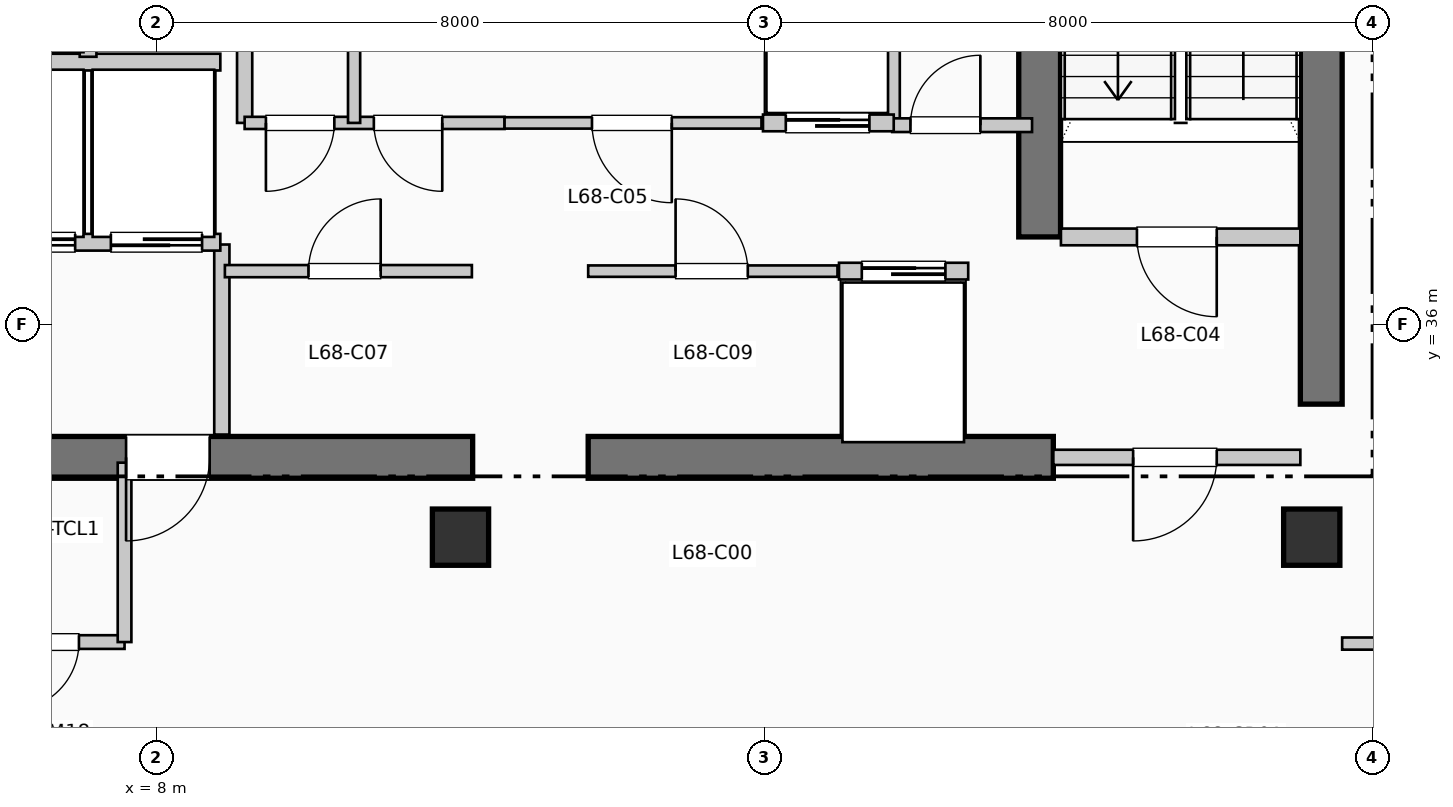
"""IFC4 building model, lengths in metres.
Left out: names, types, materials, properties, quantities, classifications, styles, units other than length and angle.
Written with IfcOpenShell. Run it as: python <this file> out.ifc"""

import sys

from ifc_helpers import new_model, si_unit, direction, frame, frame_2d, origin, origin_2d, place, context, subcontext, project, spatial, rectangle, extrude, element, fill, save


model = new_model("IFC4")
c1 = context("Model", 3, precision=1e-05, world=origin(), true_north=direction((0.0, 1.0)))
c2 = subcontext(c1, "Body", "Model", "MODEL_VIEW")
j1 = project(units=[si_unit("LENGTHUNIT", "METRE"), si_unit("PLANEANGLEUNIT", "RADIAN")], contexts=[c1])
p1 = place(None, origin())
s1 = spatial("IfcSite", under=j1, at=p1, CompositionType="ELEMENT")
p2 = place(p1, origin())
s2 = spatial("IfcBuilding", under=s1, at=p2, CompositionType="ELEMENT")
p3 = place(p2, frame((0.0, 0.0, 280.17)))
s3 = spatial("IfcBuildingStorey", under=s2, at=p3, CompositionType="ELEMENT", Elevation=280.17)
p4 = place(p3, frame((23.325, 34.95, 0.0), z_axis=(0.0, 0.0, 1.0), x_axis=(0.0, 1.0, 0.0)))
e1 = element("IfcWall", 1, at=p4, inside=s3, PredefinedType="SHEAR", context=c2, shape_type="SweptSolid", body=[
    extrude(rectangle(XDim=10.64, YDim=0.55, at=frame_2d((5.32, 0.0))), origin(), (0.0, 0.0, 1.0), 3.96),
])
p5 = place(p3, frame((1.45, 34.25, 0.0), z_axis=(0.0, 0.0, 1.0), x_axis=(1.0, 0.0, 0.0)))
e2 = element("IfcWall", 2, at=p5, inside=s3, PredefinedType="SHEAR", context=c2, shape_type="SweptSolid", body=[
    extrude(rectangle(XDim=10.71, YDim=0.55, at=frame_2d((5.355, 0.0))), origin(), (0.0, 0.0, 1.0), 3.96),
])
p6 = place(p5, frame((7.25, 0.0, 0.0), z_axis=(0.0, 0.0, 1.0), x_axis=(-1.0, 0.0, 0.0)))
e3 = element("IfcOpeningElement", 3, at=p6, cuts=e2, PredefinedType="OPENING", context=c2, shape_type="SweptSolid", body=[
    extrude(rectangle(XDim=1.1, YDim=2.15, at=frame_2d((0.55, 1.075))), frame((0.0, 0.285, 0.0), z_axis=(0.0, -1.0, 0.0), x_axis=(1.0, 0.0, 0.0)), (0.0, 0.0, 1.0), 0.57),
])
p7 = place(p3, frame((13.68, 34.25, 0.0), z_axis=(0.0, 0.0, 1.0), x_axis=(1.0, 0.0, 0.0)))
e4 = element("IfcWall", 4, at=p7, inside=s3, PredefinedType="SHEAR", context=c2, shape_type="SweptSolid", body=[
    extrude(rectangle(XDim=6.12, YDim=0.55, at=frame_2d((3.06, 0.0))), origin(), (0.0, 0.0, 1.0), 3.96),
])
p8 = place(p3, frame((19.62, 37.15, 0.0), z_axis=(0.0, 0.0, 1.0), x_axis=(0.0, 1.0, 0.0)))
e5 = element("IfcWall", 5, at=p8, inside=s3, PredefinedType="SHEAR", context=c2, shape_type="SweptSolid", body=[
    extrude(rectangle(XDim=7.89, YDim=0.55, at=frame_2d((3.945, 0.0))), origin(), (0.0, 0.0, 1.0), 3.96),
])
for number, where, z_axis, x_axis in (
    (6, (12.0, 33.2, 0.0), (0.0, 0.0, 1.0), (1.0, 0.0, 0.0)),
    (7, (23.2, 33.2, 0.0), (0.0, 0.0, 1.0), (1.0, 0.0, 0.0)),
):
    element("IfcColumn", number, at=place(p3, frame(where, z_axis=z_axis, x_axis=x_axis)), inside=s3, PredefinedType="COLUMN", context=c2, shape_type="SweptSolid", body=[
        extrude(rectangle(XDim=0.74, YDim=0.74, at=origin_2d()), origin(), (0.0, 0.0, 1.0), 3.96),
    ])
p9 = place(p3, frame((8.86, 34.55, 0.0), z_axis=(0.0, 0.0, 1.0), x_axis=(0.0, 1.0, 0.0)))
e8 = element("IfcWall", 8, at=p9, inside=s3, PredefinedType="PARTITIONING", context=c2, shape_type="SweptSolid", body=[
    extrude(rectangle(XDim=2.5, YDim=0.2, at=frame_2d((1.25, 0.0))), origin(), (0.0, 0.0, 1.0), 3.74),
])
p10 = place(p3, frame((19.9, 37.15, 0.0), z_axis=(0.0, 0.0, 1.0), x_axis=(1.0, 0.0, 0.0)))
e9 = element("IfcWall", 9, at=p10, inside=s3, PredefinedType="PARTITIONING", context=c2, shape_type="SweptSolid", body=[
    extrude(rectangle(XDim=3.15, YDim=0.22, at=frame_2d((1.575, 0.0))), origin(), (0.0, 0.0, 1.0), 3.74),
])
p11 = place(p10, frame((2.05, 0.0, 0.0), z_axis=(0.0, 0.0, 1.0), x_axis=(-1.0, 0.0, 0.0)))
e10 = element("IfcOpeningElement", 10, at=p11, cuts=e9, PredefinedType="OPENING", context=c2, shape_type="SweptSolid", body=[
    extrude(rectangle(XDim=1.05, YDim=2.15, at=frame_2d((0.525, 1.075))), frame((0.0, 0.12, 0.0), z_axis=(0.0, -1.0, 0.0), x_axis=(1.0, 0.0, 0.0)), (0.0, 0.0, 1.0), 0.24),
])
p12 = place(p3, frame((19.8, 34.25, 0.0), z_axis=(0.0, 0.0, 1.0), x_axis=(1.0, 0.0, 0.0)))
e11 = element("IfcWall", 11, at=p12, inside=s3, PredefinedType="PARTITIONING", context=c2, shape_type="SweptSolid", body=[
    extrude(rectangle(XDim=3.25, YDim=0.2, at=frame_2d((1.625, 0.0))), origin(), (0.0, 0.0, 1.0), 3.74),
])
p13 = place(p12, frame((2.15, 0.0, 0.0), z_axis=(0.0, 0.0, 1.0), x_axis=(-1.0, 0.0, 0.0)))
e12 = element("IfcOpeningElement", 12, at=p13, cuts=e11, PredefinedType="OPENING", context=c2, shape_type="SweptSolid", body=[
    extrude(rectangle(XDim=1.1, YDim=2.15, at=frame_2d((0.55, 1.075))), frame((0.0, 0.11, 0.0), z_axis=(0.0, -1.0, 0.0), x_axis=(1.0, 0.0, 0.0)), (0.0, 0.0, 1.0), 0.22),
])
p14 = place(p3, frame((5.38, 37.08, 0.0), z_axis=(0.0, 0.0, 1.0), x_axis=(1.0, 0.0, 0.0)))
e13 = element("IfcWall", 13, at=p14, inside=s3, PredefinedType="PARTITIONING", context=c2, shape_type="SweptSolid", body=[
    extrude(rectangle(XDim=3.46, YDim=0.22, at=frame_2d((1.73, 0.0))), origin(), (0.0, 0.0, 1.0), 3.74),
])
p15 = place(p14, frame((1.55, 0.0, 0.0), z_axis=(0.0, 0.0, 1.0), x_axis=(-1.0, 0.0, 0.0)))
e14 = element("IfcOpeningElement", 14, at=p15, cuts=e13, PredefinedType="OPENING", context=c2, shape_type="SweptSolid", body=[
    extrude(rectangle(XDim=1.2, YDim=2.2, at=frame_2d((0.6, 1.1))), frame((0.0, 0.12, 0.0), z_axis=(0.0, -1.0, 0.0), x_axis=(1.0, 0.0, 0.0)), (0.0, 0.0, 1.0), 0.24),
])
p16 = place(p14, frame((3.22, 0.0, 0.0), z_axis=(0.0, 0.0, 1.0), x_axis=(-1.0, 0.0, 0.0)))
e15 = element("IfcOpeningElement", 15, at=p16, cuts=e13, PredefinedType="OPENING", context=c2, shape_type="SweptSolid", body=[
    extrude(rectangle(XDim=1.2, YDim=2.2, at=frame_2d((0.6, 1.1))), frame((0.0, 0.12, 0.0), z_axis=(0.0, -1.0, 0.0), x_axis=(1.0, 0.0, 0.0)), (0.0, 0.0, 1.0), 0.24),
])
p17 = place(p3, frame((5.38, 39.45, 0.0), z_axis=(0.0, 0.0, 1.0), x_axis=(1.0, 0.0, 0.0)))
e16 = element("IfcWall", 16, at=p17, inside=s3, PredefinedType="PARTITIONING", context=c2, shape_type="SweptSolid", body=[
    extrude(rectangle(XDim=3.46, YDim=0.22, at=frame_2d((1.73, 0.0))), origin(), (0.0, 0.0, 1.0), 3.74),
])
p18 = place(p3, frame((7.1, 39.52, 0.0), z_axis=(0.0, 0.0, 1.0), x_axis=(0.0, 1.0, 0.0)))
e17 = element("IfcWall", 17, at=p18, inside=s3, PredefinedType="PARTITIONING", context=c2, shape_type="SweptSolid", body=[
    extrude(rectangle(XDim=2.93, YDim=0.22, at=frame_2d((1.465, 0.0))), origin(), (0.0, 0.0, 1.0), 3.74),
])
p19 = place(p18, frame((0.85, 0.0, 0.0)))
e18 = element("IfcOpeningElement", 18, at=p19, cuts=e17, PredefinedType="OPENING", context=c2, shape_type="SweptSolid", body=[
    extrude(rectangle(XDim=1.1, YDim=2.2, at=frame_2d((0.55, 1.1))), frame((0.0, 0.12, 0.0), z_axis=(0.0, -1.0, 0.0), x_axis=(1.0, 0.0, 0.0)), (0.0, 0.0, 1.0), 0.24),
])
for number, where, z_axis, x_axis in (
    (19, (9.16, 38.65, 0.0), (0.0, 0.0, 1.0), (0.0, 1.0, 0.0)),
    (20, (17.68, 38.65, 0.0), (0.0, 0.0, 1.0), (0.0, 1.0, 0.0)),
):
    element("IfcWall", number, at=place(p3, frame(where, z_axis=z_axis, x_axis=x_axis)), inside=s3, PredefinedType="PARTITIONING", context=c2, shape_type="SweptSolid", body=[
        extrude(rectangle(XDim=2.35, YDim=0.2, at=frame_2d((1.175, 0.0))), origin(), (0.0, 0.0, 1.0), 3.74),
    ])
p20 = place(p3, frame((17.68, 38.62, 0.0), z_axis=(0.0, 0.0, 1.0), x_axis=(1.0, 0.0, 0.0)))
e21 = element("IfcWall", 21, at=p20, inside=s3, PredefinedType="PARTITIONING", context=c2, shape_type="SweptSolid", body=[
    extrude(rectangle(XDim=1.84, YDim=0.18, at=frame_2d((0.92, 0.0))), origin(), (0.0, 0.0, 1.0), 3.74),
])
p21 = place(p20, frame((0.24, 0.0, 0.0)))
e22 = element("IfcOpeningElement", 22, at=p21, cuts=e21, PredefinedType="OPENING", context=c2, shape_type="SweptSolid", body=[
    extrude(rectangle(XDim=0.92, YDim=2.1, at=frame_2d((0.46, 1.05))), frame((0.0, 0.1, 0.0), z_axis=(0.0, -1.0, 0.0), x_axis=(1.0, 0.0, 0.0)), (0.0, 0.0, 1.0), 0.2),
])
p22 = place(p3, frame((5.5, 31.82, 0.0), z_axis=(0.0, 0.0, 1.0), x_axis=(1.0, 0.0, 0.0)))
e23 = element("IfcWall", 23, at=p22, inside=s3, PredefinedType="PLUMBINGWALL", context=c2, shape_type="SweptSolid", body=[
    extrude(rectangle(XDim=2.08, YDim=0.18, at=frame_2d((1.04, 0.0))), origin(), (0.0, 0.0, 1.0), 3.74),
])
p23 = place(p22, frame((1.48, 0.0, 0.0), z_axis=(0.0, 0.0, 1.0), x_axis=(-1.0, 0.0, 0.0)))
e24 = element("IfcOpeningElement", 24, at=p23, cuts=e23, PredefinedType="OPENING", context=c2, shape_type="SweptSolid", body=[
    extrude(rectangle(XDim=0.9, YDim=2.1, at=frame_2d((0.45, 1.05))), frame((0.0, 0.1, 0.0), z_axis=(0.0, -1.0, 0.0), x_axis=(1.0, 0.0, 0.0)), (0.0, 0.0, 1.0), 0.2),
])
p24 = place(p3, frame((7.58, 31.82, 0.0), z_axis=(0.0, 0.0, 1.0), x_axis=(0.0, 1.0, 0.0)))
e25 = element("IfcWall", 25, at=p24, inside=s3, PredefinedType="PLUMBINGWALL", context=c2, shape_type="SweptSolid", body=[
    extrude(rectangle(XDim=2.36, YDim=0.18, at=frame_2d((1.18, 0.0))), origin(), (0.0, 0.0, 1.0), 3.74),
])
p25 = place(p3, frame((8.9, 36.7, 0.0), z_axis=(0.0, 0.0, 1.0), x_axis=(1.0, 0.0, 0.0)))
e26 = element("IfcWall", 26, at=p25, inside=s3, PredefinedType="PARTITIONING", context=c2, shape_type="SweptSolid", body=[
    extrude(rectangle(XDim=3.25, YDim=0.16, at=frame_2d((1.625, 0.0))), origin(), (0.0, 0.0, 1.0), 3.74),
])
p26 = place(p25, frame((1.1, 0.0, 0.0)))
e27 = element("IfcOpeningElement", 27, at=p26, cuts=e26, PredefinedType="OPENING", context=c2, shape_type="SweptSolid", body=[
    extrude(rectangle(XDim=0.95, YDim=2.15, at=frame_2d((0.475, 1.075))), frame((0.0, 0.09, 0.0), z_axis=(0.0, -1.0, 0.0), x_axis=(1.0, 0.0, 0.0)), (0.0, 0.0, 1.0), 0.18),
])
p27 = place(p3, frame((9.16, 38.65, 0.0), z_axis=(0.0, 0.0, 1.0), x_axis=(1.0, 0.0, 0.0)))
e28 = element("IfcWall", 28, at=p27, inside=s3, PredefinedType="PARTITIONING", context=c2, shape_type="SweptSolid", body=[
    extrude(rectangle(XDim=3.42, YDim=0.16, at=frame_2d((1.71, 0.0))), origin(), (0.0, 0.0, 1.0), 3.74),
])
p28 = place(p27, frame((1.18, 0.0, 0.0), z_axis=(0.0, 0.0, 1.0), x_axis=(-1.0, 0.0, 0.0)))
e29 = element("IfcOpeningElement", 29, at=p28, cuts=e28, PredefinedType="OPENING", context=c2, shape_type="SweptSolid", body=[
    extrude(rectangle(XDim=0.9, YDim=2.15, at=frame_2d((0.45, 1.075))), frame((0.0, 0.09, 0.0), z_axis=(0.0, -1.0, 0.0), x_axis=(1.0, 0.0, 0.0)), (0.0, 0.0, 1.0), 0.18),
])
p29 = place(p27, frame((2.6, 0.0, 0.0), z_axis=(0.0, 0.0, 1.0), x_axis=(-1.0, 0.0, 0.0)))
e30 = element("IfcOpeningElement", 30, at=p29, cuts=e28, PredefinedType="OPENING", context=c2, shape_type="SweptSolid", body=[
    extrude(rectangle(XDim=0.9, YDim=2.15, at=frame_2d((0.45, 1.075))), frame((0.0, 0.09, 0.0), z_axis=(0.0, -1.0, 0.0), x_axis=(1.0, 0.0, 0.0)), (0.0, 0.0, 1.0), 0.18),
])
p30 = place(p3, frame((10.6, 38.65, 0.0), z_axis=(0.0, 0.0, 1.0), x_axis=(0.0, 1.0, 0.0)))
e31 = element("IfcWall", 31, at=p30, inside=s3, PredefinedType="PARTITIONING", context=c2, shape_type="SweptSolid", body=[
    extrude(rectangle(XDim=2.35, YDim=0.16, at=frame_2d((1.175, 0.0))), origin(), (0.0, 0.0, 1.0), 3.74),
])
p31 = place(p3, frame((13.68, 36.7, 0.0), z_axis=(0.0, 0.0, 1.0), x_axis=(1.0, 0.0, 0.0)))
e32 = element("IfcWall", 32, at=p31, inside=s3, PredefinedType="PARTITIONING", context=c2, shape_type="SweptSolid", body=[
    extrude(rectangle(XDim=3.28, YDim=0.15, at=frame_2d((1.64, 0.0))), origin(), (0.0, 0.0, 1.0), 3.74),
])
p32 = place(p31, frame((1.15, 0.0, 0.0)))
e33 = element("IfcOpeningElement", 33, at=p32, cuts=e32, PredefinedType="OPENING", context=c2, shape_type="SweptSolid", body=[
    extrude(rectangle(XDim=0.95, YDim=2.15, at=frame_2d((0.475, 1.075))), frame((0.0, 0.085, 0.0), z_axis=(0.0, -1.0, 0.0), x_axis=(1.0, 0.0, 0.0)), (0.0, 0.0, 1.0), 0.17),
])
p33 = place(p3, frame((12.58, 38.65, 0.0), z_axis=(0.0, 0.0, 1.0), x_axis=(1.0, 0.0, 0.0)))
e34 = element("IfcWall", 34, at=p33, inside=s3, PredefinedType="PARTITIONING", context=c2, shape_type="SweptSolid", body=[
    extrude(rectangle(XDim=3.38, YDim=0.15, at=frame_2d((1.69, 0.0))), origin(), (0.0, 0.0, 1.0), 3.74),
])
p34 = place(p33, frame((2.2, 0.0, 0.0), z_axis=(0.0, 0.0, 1.0), x_axis=(-1.0, 0.0, 0.0)))
e35 = element("IfcOpeningElement", 35, at=p34, cuts=e34, PredefinedType="OPENING", context=c2, shape_type="SweptSolid", body=[
    extrude(rectangle(XDim=1.05, YDim=2.15, at=frame_2d((0.525, 1.075))), frame((0.0, 0.085, 0.0), z_axis=(0.0, -1.0, 0.0), x_axis=(1.0, 0.0, 0.0)), (0.0, 0.0, 1.0), 0.17),
])
p35 = place(p3, frame((16.98, 36.7, 0.0), z_axis=(0.0, 0.0, 1.0), x_axis=(1.0, 0.0, 0.0)))
e36 = element("IfcWall", 36, at=p35, inside=s3, PredefinedType="PARTITIONING", context=c2, shape_type="SweptSolid", body=[
    extrude(rectangle(XDim=1.7, YDim=0.22, at=frame_2d((0.85, 0.0))), origin(), (0.0, 0.0, 1.0), 3.74),
])
p36 = place(p35, frame((0.3, 0.0, 0.0)))
e37 = element("IfcOpeningElement", 37, at=p36, cuts=e36, PredefinedType="OPENING", context=c2, shape_type="SweptSolid", body=[
    extrude(rectangle(XDim=1.1, YDim=2.2, at=frame_2d((0.55, 1.1))), frame((0.0, 0.12, 0.0), z_axis=(0.0, -1.0, 0.0), x_axis=(1.0, 0.0, 0.0)), (0.0, 0.0, 1.0), 0.24),
])
p37 = place(p3, frame((15.98, 38.65, 0.0), z_axis=(0.0, 0.0, 1.0), x_axis=(1.0, 0.0, 0.0)))
e38 = element("IfcWall", 38, at=p37, inside=s3, PredefinedType="PARTITIONING", context=c2, shape_type="SweptSolid", body=[
    extrude(rectangle(XDim=1.72, YDim=0.22, at=frame_2d((0.86, 0.0))), origin(), (0.0, 0.0, 1.0), 3.74),
])
p38 = place(p37, frame((0.3, 0.0, 0.0)))
e39 = element("IfcOpeningElement", 39, at=p38, cuts=e38, PredefinedType="OPENING", context=c2, shape_type="SweptSolid", body=[
    extrude(rectangle(XDim=1.1, YDim=2.2, at=frame_2d((0.55, 1.1))), frame((0.0, 0.12, 0.0), z_axis=(0.0, -1.0, 0.0), x_axis=(1.0, 0.0, 0.0)), (0.0, 0.0, 1.0), 0.24),
])
p39 = place(p3, frame((23.6, 31.8, 0.0), z_axis=(0.0, 0.0, 1.0), x_axis=(1.0, 0.0, 0.0)))
e40 = element("IfcWall", 40, at=p39, inside=s3, PredefinedType="PARTITIONING", context=c2, shape_type="SweptSolid", body=[
    extrude(rectangle(XDim=20.61, YDim=0.16, at=frame_2d((10.305, 0.0))), origin(), (0.0, 0.0, 1.0), 3.74),
])
p40 = place(p39, frame((4.677, 0.0, 0.0)))
e41 = element("IfcOpeningElement", 41, at=p40, cuts=e40, PredefinedType="OPENING", context=c2, shape_type="SweptSolid", body=[
    extrude(rectangle(XDim=0.95, YDim=2.15, at=frame_2d((0.475, 1.075))), frame((0.0, 0.09, 0.0), z_axis=(0.0, -1.0, 0.0), x_axis=(1.0, 0.0, 0.0)), (0.0, 0.0, 1.0), 0.18),
])
p41 = place(p39, frame((14.982, 0.0, 0.0)))
e42 = element("IfcOpeningElement", 42, at=p41, cuts=e40, PredefinedType="OPENING", context=c2, shape_type="SweptSolid", body=[
    extrude(rectangle(XDim=0.95, YDim=2.15, at=frame_2d((0.475, 1.075))), frame((0.0, 0.09, 0.0), z_axis=(0.0, -1.0, 0.0), x_axis=(1.0, 0.0, 0.0)), (0.0, 0.0, 1.0), 0.18),
])
p42 = place(p6, origin())
e43 = element("IfcDoor", 43, at=p42, inside=s3, OperationType="SINGLE_SWING_LEFT", PredefinedType="DOOR", context=c2, shape_type="SweptSolid", body=[
    extrude(rectangle(XDim=1.1, YDim=2.15, at=frame_2d((0.55, 1.075))), frame((0.0, 0.025, 0.0), z_axis=(0.0, -1.0, 0.0), x_axis=(1.0, 0.0, 0.0)), (0.0, 0.0, 1.0), 0.05),
])
fill(e3, e43)
p43 = place(p11, origin())
e44 = element("IfcDoor", 44, at=p43, inside=s3, OperationType="SINGLE_SWING_RIGHT", PredefinedType="DOOR", context=c2, shape_type="SweptSolid", body=[
    extrude(rectangle(XDim=1.05, YDim=2.15, at=frame_2d((0.525, 1.075))), frame((0.0, 0.025, 0.0), z_axis=(0.0, -1.0, 0.0), x_axis=(1.0, 0.0, 0.0)), (0.0, 0.0, 1.0), 0.05),
])
fill(e10, e44)
p44 = place(p13, origin())
e45 = element("IfcDoor", 45, at=p44, inside=s3, OperationType="SINGLE_SWING_LEFT", PredefinedType="DOOR", context=c2, shape_type="SweptSolid", body=[
    extrude(rectangle(XDim=1.1, YDim=2.15, at=frame_2d((0.55, 1.075))), frame((0.0, 0.025, 0.0), z_axis=(0.0, -1.0, 0.0), x_axis=(1.0, 0.0, 0.0)), (0.0, 0.0, 1.0), 0.05),
])
fill(e12, e45)
p45 = place(p15, origin())
e46 = element("IfcDoor", 46, at=p45, inside=s3, OperationType="SLIDING_TO_RIGHT", PredefinedType="DOOR", context=c2, shape_type="SweptSolid", body=[
    extrude(rectangle(XDim=1.2, YDim=2.2, at=frame_2d((0.6, 1.1))), frame((0.0, 0.025, 0.0), z_axis=(0.0, -1.0, 0.0), x_axis=(1.0, 0.0, 0.0)), (0.0, 0.0, 1.0), 0.05),
])
fill(e14, e46)
p46 = place(p16, origin())
e47 = element("IfcDoor", 47, at=p46, inside=s3, OperationType="SLIDING_TO_RIGHT", PredefinedType="DOOR", context=c2, shape_type="SweptSolid", body=[
    extrude(rectangle(XDim=1.2, YDim=2.2, at=frame_2d((0.6, 1.1))), frame((0.0, 0.025, 0.0), z_axis=(0.0, -1.0, 0.0), x_axis=(1.0, 0.0, 0.0)), (0.0, 0.0, 1.0), 0.05),
])
fill(e15, e47)
p47 = place(p21, origin())
e48 = element("IfcDoor", 48, at=p47, inside=s3, OperationType="SINGLE_SWING_RIGHT", PredefinedType="DOOR", context=c2, shape_type="SweptSolid", body=[
    extrude(rectangle(XDim=0.92, YDim=2.1, at=frame_2d((0.46, 1.05))), frame((0.0, 0.025, 0.0), z_axis=(0.0, -1.0, 0.0), x_axis=(1.0, 0.0, 0.0)), (0.0, 0.0, 1.0), 0.05),
])
fill(e22, e48)
p48 = place(p23, origin())
e49 = element("IfcDoor", 49, at=p48, inside=s3, OperationType="SINGLE_SWING_LEFT", PredefinedType="DOOR", context=c2, shape_type="SweptSolid", body=[
    extrude(rectangle(XDim=0.9, YDim=2.1, at=frame_2d((0.45, 1.05))), frame((0.0, 0.025, 0.0), z_axis=(0.0, -1.0, 0.0), x_axis=(1.0, 0.0, 0.0)), (0.0, 0.0, 1.0), 0.05),
])
fill(e24, e49)
p49 = place(p26, origin())
e50 = element("IfcDoor", 50, at=p49, inside=s3, OperationType="SINGLE_SWING_RIGHT", PredefinedType="DOOR", context=c2, shape_type="SweptSolid", body=[
    extrude(rectangle(XDim=0.95, YDim=2.15, at=frame_2d((0.475, 1.075))), frame((0.0, 0.025, 0.0), z_axis=(0.0, -1.0, 0.0), x_axis=(1.0, 0.0, 0.0)), (0.0, 0.0, 1.0), 0.05),
])
fill(e27, e50)
p50 = place(p28, origin())
e51 = element("IfcDoor", 51, at=p50, inside=s3, OperationType="SINGLE_SWING_LEFT", PredefinedType="DOOR", context=c2, shape_type="SweptSolid", body=[
    extrude(rectangle(XDim=0.9, YDim=2.15, at=frame_2d((0.45, 1.075))), frame((0.0, 0.025, 0.0), z_axis=(0.0, -1.0, 0.0), x_axis=(1.0, 0.0, 0.0)), (0.0, 0.0, 1.0), 0.05),
])
fill(e29, e51)
p51 = place(p29, origin())
e52 = element("IfcDoor", 52, at=p51, inside=s3, OperationType="SINGLE_SWING_RIGHT", PredefinedType="DOOR", context=c2, shape_type="SweptSolid", body=[
    extrude(rectangle(XDim=0.9, YDim=2.15, at=frame_2d((0.45, 1.075))), frame((0.0, 0.025, 0.0), z_axis=(0.0, -1.0, 0.0), x_axis=(1.0, 0.0, 0.0)), (0.0, 0.0, 1.0), 0.05),
])
fill(e30, e52)
p52 = place(p32, origin())
e53 = element("IfcDoor", 53, at=p52, inside=s3, OperationType="SINGLE_SWING_LEFT", PredefinedType="DOOR", context=c2, shape_type="SweptSolid", body=[
    extrude(rectangle(XDim=0.95, YDim=2.15, at=frame_2d((0.475, 1.075))), frame((0.0, 0.025, 0.0), z_axis=(0.0, -1.0, 0.0), x_axis=(1.0, 0.0, 0.0)), (0.0, 0.0, 1.0), 0.05),
])
fill(e33, e53)
p53 = place(p34, origin())
e54 = element("IfcDoor", 54, at=p53, inside=s3, OperationType="SINGLE_SWING_RIGHT", PredefinedType="DOOR", context=c2, shape_type="SweptSolid", body=[
    extrude(rectangle(XDim=1.05, YDim=2.15, at=frame_2d((0.525, 1.075))), frame((0.0, 0.025, 0.0), z_axis=(0.0, -1.0, 0.0), x_axis=(1.0, 0.0, 0.0)), (0.0, 0.0, 1.0), 0.05),
])
fill(e35, e54)
p54 = place(p36, origin())
e55 = element("IfcDoor", 55, at=p54, inside=s3, OperationType="SLIDING_TO_LEFT", PredefinedType="DOOR", context=c2, shape_type="SweptSolid", body=[
    extrude(rectangle(XDim=1.1, YDim=2.2, at=frame_2d((0.55, 1.1))), frame((0.0, 0.025, 0.0), z_axis=(0.0, -1.0, 0.0), x_axis=(1.0, 0.0, 0.0)), (0.0, 0.0, 1.0), 0.05),
])
fill(e37, e55)
p55 = place(p38, origin())
e56 = element("IfcDoor", 56, at=p55, inside=s3, OperationType="SLIDING_TO_LEFT", PredefinedType="DOOR", context=c2, shape_type="SweptSolid", body=[
    extrude(rectangle(XDim=1.1, YDim=2.2, at=frame_2d((0.55, 1.1))), frame((0.0, 0.025, 0.0), z_axis=(0.0, -1.0, 0.0), x_axis=(1.0, 0.0, 0.0)), (0.0, 0.0, 1.0), 0.05),
])
fill(e39, e56)
save(model, sys.argv[1])
